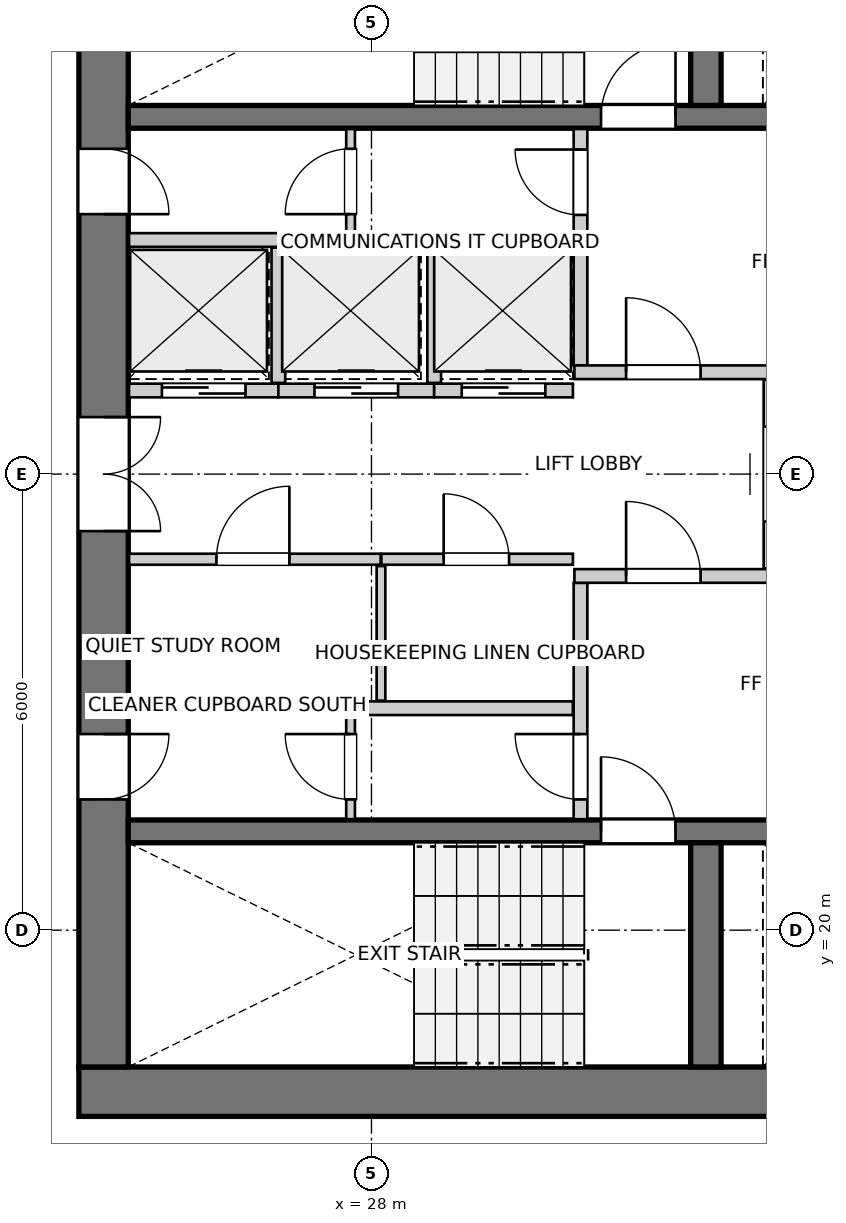
"""IFC4 building model, lengths in metres.
Left out: names, types, materials, properties, quantities, classifications, styles, units other than length and angle.
Written with IfcOpenShell. Run it as: python <this file> out.ifc"""

import sys

from ifc_helpers import new_model, si_unit, direction, frame, frame_2d, origin, place, context, subcontext, project, spatial, rectangle, extrude, source, transform, mapped, element, fill, save


model = new_model("IFC4")
c1 = context("Model", 3, precision=1e-05, world=origin(), true_north=direction((0.0, 1.0)))
c2 = subcontext(c1, "Body", "Model", "MODEL_VIEW")
j1 = project(units=[si_unit("LENGTHUNIT", "METRE"), si_unit("PLANEANGLEUNIT", "RADIAN")], contexts=[c1])
p1 = place(None, origin())
s1 = spatial("IfcSite", under=j1, at=p1, CompositionType="ELEMENT")
p2 = place(p1, origin())
s2 = spatial("IfcBuilding", under=s1, at=p2, CompositionType="ELEMENT")
p3 = place(p2, frame((0.0, 0.0, 145.8)))
s3 = spatial("IfcBuildingStorey", under=s2, at=p3, CompositionType="ELEMENT", Elevation=145.8)
p4 = place(p3, frame((24.15, 17.875, 0.0), z_axis=(0.0, 0.0, 1.0), x_axis=(1.0, 0.0, 0.0)))
e1 = element("IfcWall", 1, at=p4, inside=s3, PredefinedType="SHEAR", context=c2, shape_type="SweptSolid", body=[
    extrude(rectangle(XDim=12.4, YDim=0.65, at=frame_2d((6.2, 0.0))), origin(), (0.0, 0.0, 1.0), 2.95),
])
p5 = place(p3, frame((24.475, 33.8, 0.0), z_axis=(0.0, 0.0, 1.0), x_axis=(0.0, -1.0, 0.0)))
e2 = element("IfcWall", 2, at=p5, inside=s3, PredefinedType="SHEAR", context=c2, shape_type="SweptSolid", body=[
    extrude(rectangle(XDim=15.6, YDim=0.65, at=frame_2d((7.8, 0.0))), origin(), (0.0, 0.0, 1.0), 2.95),
])
p6 = place(p5, frame((7.05, 0.0, 0.0)))
e3 = element("IfcOpeningElement", 3, at=p6, cuts=e2, PredefinedType="OPENING", context=c2, shape_type="SweptSolid", body=[
    extrude(rectangle(XDim=1.5, YDim=2.15, at=frame_2d((0.75, 1.075))), frame((0.0, 0.335, 0.0), z_axis=(0.0, -1.0, 0.0), x_axis=(1.0, 0.0, 0.0)), (0.0, 0.0, 1.0), 0.67),
])
p7 = place(p5, frame((3.52, 0.0, 0.0)))
e4 = element("IfcOpeningElement", 4, at=p7, cuts=e2, PredefinedType="OPENING", context=c2, shape_type="SweptSolid", body=[
    extrude(rectangle(XDim=0.86, YDim=2.05, at=frame_2d((0.43, 1.025))), frame((0.0, 0.335, 0.0), z_axis=(0.0, -1.0, 0.0), x_axis=(1.0, 0.0, 0.0)), (0.0, 0.0, 1.0), 0.67),
])
p8 = place(p5, frame((11.22, 0.0, 0.0)))
e5 = element("IfcOpeningElement", 5, at=p8, cuts=e2, PredefinedType="OPENING", context=c2, shape_type="SweptSolid", body=[
    extrude(rectangle(XDim=0.86, YDim=2.05, at=frame_2d((0.43, 1.025))), frame((0.0, 0.335, 0.0), z_axis=(0.0, -1.0, 0.0), x_axis=(1.0, 0.0, 0.0)), (0.0, 0.0, 1.0), 0.67),
])
p9 = place(p3, frame((24.8, 21.3, 0.0), z_axis=(0.0, 0.0, 1.0), x_axis=(1.0, 0.0, 0.0)))
e6 = element("IfcWall", 6, at=p9, inside=s3, PredefinedType="SHEAR", context=c2, shape_type="SweptSolid", body=[
    extrude(rectangle(XDim=11.1, YDim=0.3, at=frame_2d((5.55, 0.0))), origin(), (0.0, 0.0, 1.0), 2.95),
])
p10 = place(p9, frame((6.22, 0.0, 0.0)))
e7 = element("IfcOpeningElement", 7, at=p10, cuts=e6, PredefinedType="OPENING", context=c2, shape_type="SweptSolid", body=[
    extrude(rectangle(XDim=0.98, YDim=2.15, at=frame_2d((0.49, 1.075))), frame((0.0, 0.16, 0.0), z_axis=(0.0, -1.0, 0.0), x_axis=(1.0, 0.0, 0.0)), (0.0, 0.0, 1.0), 0.32),
])
p11 = place(p9, frame((9.15, 0.0, 0.0)))
e8 = element("IfcOpeningElement", 8, at=p11, cuts=e6, PredefinedType="OPENING", context=c2, shape_type="SweptSolid", body=[
    extrude(rectangle(XDim=1.15, YDim=2.15, at=frame_2d((0.575, 1.075))), frame((0.0, 0.16, 0.0), z_axis=(0.0, -1.0, 0.0), x_axis=(1.0, 0.0, 0.0)), (0.0, 0.0, 1.0), 0.32),
])
p12 = place(p3, frame((32.4, 18.2, 0.0), z_axis=(0.0, 0.0, 1.0), x_axis=(0.0, 1.0, 0.0)))
e9 = element("IfcWall", 9, at=p12, inside=s3, PredefinedType="SHEAR", context=c2, shape_type="SweptSolid", body=[
    extrude(rectangle(XDim=2.95, YDim=0.4, at=frame_2d((1.475, 0.0))), origin(), (0.0, 0.0, 1.0), 2.95),
])
p13 = place(p3, frame((24.8, 30.7, 0.0), z_axis=(0.0, 0.0, 1.0), x_axis=(1.0, 0.0, 0.0)))
e10 = element("IfcWall", 10, at=p13, inside=s3, PredefinedType="SHEAR", context=c2, shape_type="SweptSolid", body=[
    extrude(rectangle(XDim=11.1, YDim=0.3, at=frame_2d((5.55, 0.0))), origin(), (0.0, 0.0, 1.0), 2.95),
])
p14 = place(p13, frame((6.22, 0.0, 0.0)))
e11 = element("IfcOpeningElement", 11, at=p14, cuts=e10, PredefinedType="OPENING", context=c2, shape_type="SweptSolid", body=[
    extrude(rectangle(XDim=0.98, YDim=2.15, at=frame_2d((0.49, 1.075))), frame((0.0, 0.16, 0.0), z_axis=(0.0, -1.0, 0.0), x_axis=(1.0, 0.0, 0.0)), (0.0, 0.0, 1.0), 0.32),
])
p15 = place(p13, frame((9.15, 0.0, 0.0)))
e12 = element("IfcOpeningElement", 12, at=p15, cuts=e10, PredefinedType="OPENING", context=c2, shape_type="SweptSolid", body=[
    extrude(rectangle(XDim=1.15, YDim=2.15, at=frame_2d((0.575, 1.075))), frame((0.0, 0.16, 0.0), z_axis=(0.0, -1.0, 0.0), x_axis=(1.0, 0.0, 0.0)), (0.0, 0.0, 1.0), 0.32),
])
p16 = place(p3, frame((32.4, 30.85, 0.0), z_axis=(0.0, 0.0, 1.0), x_axis=(0.0, 1.0, 0.0)))
e13 = element("IfcWall", 13, at=p16, inside=s3, PredefinedType="SHEAR", context=c2, shape_type="SweptSolid", body=[
    extrude(rectangle(XDim=2.95, YDim=0.4, at=frame_2d((1.475, 0.0))), origin(), (0.0, 0.0, 1.0), 2.95),
])
p17 = place(p3, frame((30.75, 21.46, 0.0), z_axis=(0.0, 0.0, 1.0), x_axis=(0.0, 1.0, 0.0)))
e14 = element("IfcWall", 14, at=p17, inside=s3, PredefinedType="PARTITIONING", context=c2, shape_type="SweptSolid", body=[
    extrude(rectangle(XDim=3.11, YDim=0.18, at=frame_2d((1.555, 0.0))), origin(), (0.0, 0.0, 1.0), 2.95),
])
p18 = place(p17, frame((0.26, 0.0, 0.0)))
e15 = element("IfcOpeningElement", 15, at=p18, cuts=e14, PredefinedType="OPENING", context=c2, shape_type="SweptSolid", body=[
    extrude(rectangle(XDim=0.86, YDim=2.05, at=frame_2d((0.43, 1.025))), frame((0.0, 0.1, 0.0), z_axis=(0.0, -1.0, 0.0), x_axis=(1.0, 0.0, 0.0)), (0.0, 0.0, 1.0), 0.2),
])
p19 = place(p3, frame((30.67, 24.66, 0.0), z_axis=(0.0, 0.0, 1.0), x_axis=(1.0, 0.0, 0.0)))
e16 = element("IfcWall", 16, at=p19, inside=s3, PredefinedType="PARTITIONING", context=c2, shape_type="SweptSolid", body=[
    extrude(rectangle(XDim=5.22, YDim=0.18, at=frame_2d((2.61, 0.0))), origin(), (0.0, 0.0, 1.0), 2.95),
])
p20 = place(p19, frame((0.68, 0.0, 0.0)))
e17 = element("IfcOpeningElement", 17, at=p20, cuts=e16, PredefinedType="OPENING", context=c2, shape_type="SweptSolid", body=[
    extrude(rectangle(XDim=0.98, YDim=2.15, at=frame_2d((0.49, 1.075))), frame((0.0, 0.1, 0.0), z_axis=(0.0, -1.0, 0.0), x_axis=(1.0, 0.0, 0.0)), (0.0, 0.0, 1.0), 0.2),
])
p21 = place(p3, frame((30.75, 27.43, 0.0), z_axis=(0.0, 0.0, 1.0), x_axis=(0.0, 1.0, 0.0)))
e18 = element("IfcWall", 18, at=p21, inside=s3, PredefinedType="PARTITIONING", context=c2, shape_type="SweptSolid", body=[
    extrude(rectangle(XDim=3.11, YDim=0.18, at=frame_2d((1.555, 0.0))), origin(), (0.0, 0.0, 1.0), 2.95),
])
p22 = place(p21, frame((1.98, 0.0, 0.0)))
e19 = element("IfcOpeningElement", 19, at=p22, cuts=e18, PredefinedType="OPENING", context=c2, shape_type="SweptSolid", body=[
    extrude(rectangle(XDim=0.86, YDim=2.05, at=frame_2d((0.43, 1.025))), frame((0.0, 0.1, 0.0), z_axis=(0.0, -1.0, 0.0), x_axis=(1.0, 0.0, 0.0)), (0.0, 0.0, 1.0), 0.2),
])
p23 = place(p3, frame((30.67, 27.34, 0.0), z_axis=(0.0, 0.0, 1.0), x_axis=(1.0, 0.0, 0.0)))
e20 = element("IfcWall", 20, at=p23, inside=s3, PredefinedType="PARTITIONING", context=c2, shape_type="SweptSolid", body=[
    extrude(rectangle(XDim=5.22, YDim=0.18, at=frame_2d((2.61, 0.0))), origin(), (0.0, 0.0, 1.0), 2.95),
])
p24 = place(p23, frame((0.68, 0.0, 0.0)))
e21 = element("IfcOpeningElement", 21, at=p24, cuts=e20, PredefinedType="OPENING", context=c2, shape_type="SweptSolid", body=[
    extrude(rectangle(XDim=0.98, YDim=2.15, at=frame_2d((0.49, 1.075))), frame((0.0, 0.1, 0.0), z_axis=(0.0, -1.0, 0.0), x_axis=(1.0, 0.0, 0.0)), (0.0, 0.0, 1.0), 0.2),
])
p25 = place(p3, frame((33.25, 24.76, 0.0), z_axis=(0.0, 0.0, 1.0), x_axis=(0.0, 1.0, 0.0)))
e22 = element("IfcWall", 22, at=p25, inside=s3, PredefinedType="PARTITIONING", context=c2, shape_type="SweptSolid", body=[
    extrude(rectangle(XDim=2.48, YDim=0.18, at=frame_2d((1.24, 0.0))), origin(), (0.0, 0.0, 1.0), 2.95),
])
p26 = place(p25, frame((0.615, 0.0, 0.0)))
e23 = element("IfcOpeningElement", 23, at=p26, cuts=e22, PredefinedType="OPENING", context=c2, shape_type="SweptSolid", body=[
    extrude(rectangle(XDim=1.25, YDim=2.15, at=frame_2d((0.625, 1.075))), frame((0.0, 0.1, 0.0), z_axis=(0.0, -1.0, 0.0), x_axis=(1.0, 0.0, 0.0)), (0.0, 0.0, 1.0), 0.2),
])
p27 = place(p3, frame((24.81, 22.92, 0.0), z_axis=(0.0, 0.0, 1.0), x_axis=(1.0, 0.0, 0.0)))
e24 = element("IfcWall", 24, at=p27, inside=s3, PredefinedType="PARTITIONING", context=c2, shape_type="SweptSolid", body=[
    extrude(rectangle(XDim=5.84, YDim=0.18, at=frame_2d((2.92, 0.0))), origin(), (0.0, 0.0, 1.0), 2.95),
])
p28 = place(p3, frame((24.81, 24.88, 0.0), z_axis=(0.0, 0.0, 1.0), x_axis=(1.0, 0.0, 0.0)))
e25 = element("IfcWall", 25, at=p28, inside=s3, PredefinedType="PARTITIONING", context=c2, shape_type="SweptSolid", body=[
    extrude(rectangle(XDim=3.31, YDim=0.145, at=frame_2d((1.655, 0.0))), origin(), (0.0, 0.0, 1.0), 2.95),
])
p29 = place(p28, frame((1.15, 0.0, 0.0)))
e26 = element("IfcOpeningElement", 26, at=p29, cuts=e25, PredefinedType="OPENING", context=c2, shape_type="SweptSolid", body=[
    extrude(rectangle(XDim=0.96, YDim=2.1, at=frame_2d((0.48, 1.05))), frame((0.0, 0.083, 0.0), z_axis=(0.0, -1.0, 0.0), x_axis=(1.0, 0.0, 0.0)), (0.0, 0.0, 1.0), 0.165),
])
p30 = place(p3, frame((28.13, 24.88, 0.0), z_axis=(0.0, 0.0, 1.0), x_axis=(1.0, 0.0, 0.0)))
e27 = element("IfcWall", 27, at=p30, inside=s3, PredefinedType="PARTITIONING", context=c2, shape_type="SweptSolid", body=[
    extrude(rectangle(XDim=2.52, YDim=0.145, at=frame_2d((1.26, 0.0))), origin(), (0.0, 0.0, 1.0), 2.95),
])
p31 = place(p30, frame((0.82, 0.0, 0.0)))
e28 = element("IfcOpeningElement", 28, at=p31, cuts=e27, PredefinedType="OPENING", context=c2, shape_type="SweptSolid", body=[
    extrude(rectangle(XDim=0.86, YDim=2.05, at=frame_2d((0.43, 1.025))), frame((0.0, 0.083, 0.0), z_axis=(0.0, -1.0, 0.0), x_axis=(1.0, 0.0, 0.0)), (0.0, 0.0, 1.0), 0.165),
])
p32 = place(p3, frame((28.125, 23.02, 0.0), z_axis=(0.0, 0.0, 1.0), x_axis=(0.0, 1.0, 0.0)))
e29 = element("IfcWall", 29, at=p32, inside=s3, PredefinedType="PARTITIONING", context=c2, shape_type="SweptSolid", body=[
    extrude(rectangle(XDim=1.77, YDim=0.115, at=frame_2d((0.885, 0.0))), origin(), (0.0, 0.0, 1.0), 2.95),
])
p33 = place(p3, frame((24.81, 29.08, 0.0), z_axis=(0.0, 0.0, 1.0), x_axis=(1.0, 0.0, 0.0)))
e30 = element("IfcWall", 30, at=p33, inside=s3, PredefinedType="PARTITIONING", context=c2, shape_type="SweptSolid", body=[
    extrude(rectangle(XDim=5.84, YDim=0.18, at=frame_2d((2.92, 0.0))), origin(), (0.0, 0.0, 1.0), 2.95),
])
p34 = place(p3, frame((24.81, 27.1, 0.0), z_axis=(0.0, 0.0, 1.0), x_axis=(1.0, 0.0, 0.0)))
e31 = element("IfcWall", 31, at=p34, inside=s3, PredefinedType="PARTITIONING", context=c2, shape_type="SweptSolid", body=[
    extrude(rectangle(XDim=1.965, YDim=0.18, at=frame_2d((0.982, 0.0))), origin(), (0.0, 0.0, 1.0), 2.95),
])
p35 = place(p34, frame((0.433, 0.0, 0.0)))
e32 = element("IfcOpeningElement", 32, at=p35, cuts=e31, PredefinedType="OPENING", context=c2, shape_type="SweptSolid", body=[
    extrude(rectangle(XDim=1.1, YDim=2.15, at=frame_2d((0.55, 1.075))), frame((0.0, 0.1, 0.0), z_axis=(0.0, -1.0, 0.0), x_axis=(1.0, 0.0, 0.0)), (0.0, 0.0, 1.0), 0.2),
])
p36 = place(p3, frame((26.775, 27.1, 0.0), z_axis=(0.0, 0.0, 1.0), x_axis=(1.0, 0.0, 0.0)))
e33 = element("IfcWall", 33, at=p36, inside=s3, PredefinedType="PARTITIONING", context=c2, shape_type="SweptSolid", body=[
    extrude(rectangle(XDim=2.05, YDim=0.18, at=frame_2d((1.025, 0.0))), origin(), (0.0, 0.0, 1.0), 2.95),
])
p37 = place(p36, frame((0.475, 0.0, 0.0)))
e34 = element("IfcOpeningElement", 34, at=p37, cuts=e33, PredefinedType="OPENING", context=c2, shape_type="SweptSolid", body=[
    extrude(rectangle(XDim=1.1, YDim=2.15, at=frame_2d((0.55, 1.075))), frame((0.0, 0.1, 0.0), z_axis=(0.0, -1.0, 0.0), x_axis=(1.0, 0.0, 0.0)), (0.0, 0.0, 1.0), 0.2),
])
p38 = place(p3, frame((26.775, 27.2, 0.0), z_axis=(0.0, 0.0, 1.0), x_axis=(0.0, 1.0, 0.0)))
e35 = element("IfcWall", 35, at=p38, inside=s3, PredefinedType="PARTITIONING", context=c2, shape_type="SweptSolid", body=[
    extrude(rectangle(XDim=1.78, YDim=0.18, at=frame_2d((0.89, 0.0))), origin(), (0.0, 0.0, 1.0), 2.95),
])
p39 = place(p3, frame((28.825, 27.1, 0.0), z_axis=(0.0, 0.0, 1.0), x_axis=(1.0, 0.0, 0.0)))
e36 = element("IfcWall", 36, at=p39, inside=s3, PredefinedType="PARTITIONING", context=c2, shape_type="SweptSolid", body=[
    extrude(rectangle(XDim=1.825, YDim=0.18, at=frame_2d((0.913, 0.0))), origin(), (0.0, 0.0, 1.0), 2.95),
])
p40 = place(p39, frame((0.363, 0.0, 0.0)))
e37 = element("IfcOpeningElement", 37, at=p40, cuts=e36, PredefinedType="OPENING", context=c2, shape_type="SweptSolid", body=[
    extrude(rectangle(XDim=1.1, YDim=2.15, at=frame_2d((0.55, 1.075))), frame((0.0, 0.1, 0.0), z_axis=(0.0, -1.0, 0.0), x_axis=(1.0, 0.0, 0.0)), (0.0, 0.0, 1.0), 0.2),
])
p41 = place(p3, frame((28.825, 27.2, 0.0), z_axis=(0.0, 0.0, 1.0), x_axis=(0.0, 1.0, 0.0)))
e38 = element("IfcWall", 38, at=p41, inside=s3, PredefinedType="PARTITIONING", context=c2, shape_type="SweptSolid", body=[
    extrude(rectangle(XDim=1.78, YDim=0.18, at=frame_2d((0.89, 0.0))), origin(), (0.0, 0.0, 1.0), 2.95),
])
p42 = place(p3, frame((27.725, 21.46, 0.0), z_axis=(0.0, 0.0, 1.0), x_axis=(0.0, 1.0, 0.0)))
e39 = element("IfcWall", 39, at=p42, inside=s3, PredefinedType="PARTITIONING", context=c2, shape_type="SweptSolid", body=[
    extrude(rectangle(XDim=1.38, YDim=0.115, at=frame_2d((0.69, 0.0))), origin(), (0.0, 0.0, 1.0), 2.95),
])
p43 = place(p42, frame((0.26, 0.0, 0.0)))
e40 = element("IfcOpeningElement", 40, at=p43, cuts=e39, PredefinedType="OPENING", context=c2, shape_type="SweptSolid", body=[
    extrude(rectangle(XDim=0.86, YDim=2.05, at=frame_2d((0.43, 1.025))), frame((0.0, 0.067, 0.0), z_axis=(0.0, -1.0, 0.0), x_axis=(1.0, 0.0, 0.0)), (0.0, 0.0, 1.0), 0.135),
])
p44 = place(p3, frame((27.725, 29.16, 0.0), z_axis=(0.0, 0.0, 1.0), x_axis=(0.0, 1.0, 0.0)))
e41 = element("IfcWall", 41, at=p44, inside=s3, PredefinedType="PARTITIONING", context=c2, shape_type="SweptSolid", body=[
    extrude(rectangle(XDim=1.38, YDim=0.115, at=frame_2d((0.69, 0.0))), origin(), (0.0, 0.0, 1.0), 2.95),
])
p45 = place(p44, frame((0.26, 0.0, 0.0)))
e42 = element("IfcOpeningElement", 42, at=p45, cuts=e41, PredefinedType="OPENING", context=c2, shape_type="SweptSolid", body=[
    extrude(rectangle(XDim=0.86, YDim=2.05, at=frame_2d((0.43, 1.025))), frame((0.0, 0.067, 0.0), z_axis=(0.0, -1.0, 0.0), x_axis=(1.0, 0.0, 0.0)), (0.0, 0.0, 1.0), 0.135),
])
m1 = source(origin(), c2, "Body", "SweptSolid", [
    extrude(rectangle(XDim=0.98, YDim=2.15, at=frame_2d((0.49, 1.075))), frame((0.0, 0.025, 0.0), z_axis=(0.0, -1.0, 0.0), x_axis=(1.0, 0.0, 0.0)), (0.0, 0.0, 1.0), 0.05),
])
p46 = place(p10, origin())
e43 = element("IfcDoor", 43, at=p46, inside=s3, OperationType="SINGLE_SWING_LEFT", PredefinedType="DOOR", context=c2, shape_type="MappedRepresentation", body=[
    mapped(m1, transform((0.0, 0.0, 0.0), x_axis=(1.0, 0.0, 0.0), y_axis=(0.0, 1.0, 0.0), z_axis=(0.0, 0.0, 1.0), scale=1.0)),
])
fill(e7, e43)
p47 = place(p14, origin())
e44 = element("IfcDoor", 44, at=p47, inside=s3, OperationType="SINGLE_SWING_RIGHT", PredefinedType="DOOR", context=c2, shape_type="MappedRepresentation", body=[
    mapped(m1, transform((0.0, 0.0, 0.0), x_axis=(1.0, 0.0, 0.0), y_axis=(0.0, 1.0, 0.0), z_axis=(0.0, 0.0, 1.0), scale=1.0)),
])
fill(e11, e44)
m2 = source(origin(), c2, "Body", "SweptSolid", [
    extrude(rectangle(XDim=1.5, YDim=2.15, at=frame_2d((0.75, 1.075))), frame((0.0, 0.025, 0.0), z_axis=(0.0, -1.0, 0.0), x_axis=(1.0, 0.0, 0.0)), (0.0, 0.0, 1.0), 0.05),
])
p48 = place(p6, origin())
e45 = element("IfcDoor", 45, at=p48, inside=s3, OperationType="DOUBLE_DOOR_SINGLE_SWING", PredefinedType="DOOR", context=c2, shape_type="MappedRepresentation", body=[
    mapped(m2, transform((0.0, 0.0, 0.0), x_axis=(1.0, 0.0, 0.0), y_axis=(0.0, 1.0, 0.0), z_axis=(0.0, 0.0, 1.0), scale=1.0)),
])
fill(e3, e45)
m3 = source(origin(), c2, "Body", "SweptSolid", [
    extrude(rectangle(XDim=0.86, YDim=2.05, at=frame_2d((0.43, 1.025))), frame((0.0, 0.025, 0.0), z_axis=(0.0, -1.0, 0.0), x_axis=(1.0, 0.0, 0.0)), (0.0, 0.0, 1.0), 0.05),
])
p49 = place(p7, origin())
e46 = element("IfcDoor", 46, at=p49, inside=s3, OperationType="SINGLE_SWING_RIGHT", PredefinedType="DOOR", context=c2, shape_type="MappedRepresentation", body=[
    mapped(m3, transform((0.0, 0.0, 0.0), x_axis=(1.0, 0.0, 0.0), y_axis=(0.0, 1.0, 0.0), z_axis=(0.0, 0.0, 1.0), scale=1.0)),
])
fill(e4, e46)
p50 = place(p8, origin())
e47 = element("IfcDoor", 47, at=p50, inside=s3, OperationType="SINGLE_SWING_LEFT", PredefinedType="DOOR", context=c2, shape_type="MappedRepresentation", body=[
    mapped(m3, transform((0.0, 0.0, 0.0), x_axis=(1.0, 0.0, 0.0), y_axis=(0.0, 1.0, 0.0), z_axis=(0.0, 0.0, 1.0), scale=1.0)),
])
fill(e5, e47)
p51 = place(p18, origin())
e48 = element("IfcDoor", 48, at=p51, inside=s3, OperationType="SINGLE_SWING_RIGHT", PredefinedType="DOOR", context=c2, shape_type="MappedRepresentation", body=[
    mapped(m3, transform((0.0, 0.0, 0.0), x_axis=(1.0, 0.0, 0.0), y_axis=(0.0, 1.0, 0.0), z_axis=(0.0, 0.0, 1.0), scale=1.0)),
])
fill(e15, e48)
p52 = place(p20, origin())
e49 = element("IfcDoor", 49, at=p52, inside=s3, OperationType="SINGLE_SWING_LEFT", PredefinedType="DOOR", context=c2, shape_type="MappedRepresentation", body=[
    mapped(m1, transform((0.0, 0.0, 0.0), x_axis=(1.0, 0.0, 0.0), y_axis=(0.0, 1.0, 0.0), z_axis=(0.0, 0.0, 1.0), scale=1.0)),
])
fill(e17, e49)
p53 = place(p22, origin())
e50 = element("IfcDoor", 50, at=p53, inside=s3, OperationType="SINGLE_SWING_RIGHT", PredefinedType="DOOR", context=c2, shape_type="MappedRepresentation", body=[
    mapped(m3, transform((0.0, 0.0, 0.0), x_axis=(1.0, 0.0, 0.0), y_axis=(0.0, 1.0, 0.0), z_axis=(0.0, 0.0, 1.0), scale=1.0)),
])
fill(e19, e50)
p54 = place(p24, origin())
e51 = element("IfcDoor", 51, at=p54, inside=s3, OperationType="SINGLE_SWING_LEFT", PredefinedType="DOOR", context=c2, shape_type="MappedRepresentation", body=[
    mapped(m1, transform((0.0, 0.0, 0.0), x_axis=(1.0, 0.0, 0.0), y_axis=(0.0, 1.0, 0.0), z_axis=(0.0, 0.0, 1.0), scale=1.0)),
])
fill(e21, e51)
m4 = source(origin(), c2, "Body", "SweptSolid", [
    extrude(rectangle(XDim=0.96, YDim=2.1, at=frame_2d((0.48, 1.05))), frame((0.0, 0.025, 0.0), z_axis=(0.0, -1.0, 0.0), x_axis=(1.0, 0.0, 0.0)), (0.0, 0.0, 1.0), 0.05),
])
p55 = place(p29, origin())
e52 = element("IfcDoor", 52, at=p55, inside=s3, OperationType="SINGLE_SWING_RIGHT", PredefinedType="DOOR", context=c2, shape_type="MappedRepresentation", body=[
    mapped(m4, transform((0.0, 0.0, 0.0), x_axis=(1.0, 0.0, 0.0), y_axis=(0.0, 1.0, 0.0), z_axis=(0.0, 0.0, 1.0), scale=1.0)),
])
fill(e26, e52)
p56 = place(p31, origin())
e53 = element("IfcDoor", 53, at=p56, inside=s3, OperationType="SINGLE_SWING_LEFT", PredefinedType="DOOR", context=c2, shape_type="MappedRepresentation", body=[
    mapped(m3, transform((0.0, 0.0, 0.0), x_axis=(1.0, 0.0, 0.0), y_axis=(0.0, 1.0, 0.0), z_axis=(0.0, 0.0, 1.0), scale=1.0)),
])
fill(e28, e53)
m5 = source(origin(), c2, "Body", "SweptSolid", [
    extrude(rectangle(XDim=1.1, YDim=2.15, at=frame_2d((0.55, 1.075))), frame((0.0, 0.025, 0.0), z_axis=(0.0, -1.0, 0.0), x_axis=(1.0, 0.0, 0.0)), (0.0, 0.0, 1.0), 0.05),
])
p57 = place(p35, origin())
e54 = element("IfcDoor", 54, at=p57, inside=s3, OperationType="DOUBLE_DOOR_SLIDING", PredefinedType="DOOR", context=c2, shape_type="MappedRepresentation", body=[
    mapped(m5, transform((0.0, 0.0, 0.0), x_axis=(1.0, 0.0, 0.0), y_axis=(0.0, 1.0, 0.0), z_axis=(0.0, 0.0, 1.0), scale=1.0)),
])
fill(e32, e54)
p58 = place(p37, origin())
e55 = element("IfcDoor", 55, at=p58, inside=s3, OperationType="DOUBLE_DOOR_SLIDING", PredefinedType="DOOR", context=c2, shape_type="MappedRepresentation", body=[
    mapped(m5, transform((0.0, 0.0, 0.0), x_axis=(1.0, 0.0, 0.0), y_axis=(0.0, 1.0, 0.0), z_axis=(0.0, 0.0, 1.0), scale=1.0)),
])
fill(e34, e55)
p59 = place(p40, origin())
e56 = element("IfcDoor", 56, at=p59, inside=s3, OperationType="DOUBLE_DOOR_SLIDING", PredefinedType="DOOR", context=c2, shape_type="MappedRepresentation", body=[
    mapped(m5, transform((0.0, 0.0, 0.0), x_axis=(1.0, 0.0, 0.0), y_axis=(0.0, 1.0, 0.0), z_axis=(0.0, 0.0, 1.0), scale=1.0)),
])
fill(e37, e56)
p60 = place(p43, origin())
e57 = element("IfcDoor", 57, at=p60, inside=s3, OperationType="SINGLE_SWING_RIGHT", PredefinedType="DOOR", context=c2, shape_type="MappedRepresentation", body=[
    mapped(m3, transform((0.0, 0.0, 0.0), x_axis=(1.0, 0.0, 0.0), y_axis=(0.0, 1.0, 0.0), z_axis=(0.0, 0.0, 1.0), scale=1.0)),
])
fill(e40, e57)
p61 = place(p45, origin())
e58 = element("IfcDoor", 58, at=p61, inside=s3, OperationType="SINGLE_SWING_LEFT", PredefinedType="DOOR", context=c2, shape_type="MappedRepresentation", body=[
    mapped(m3, transform((0.0, 0.0, 0.0), x_axis=(1.0, 0.0, 0.0), y_axis=(0.0, 1.0, 0.0), z_axis=(0.0, 0.0, 1.0), scale=1.0)),
])
fill(e42, e58)
save(model, sys.argv[1])
